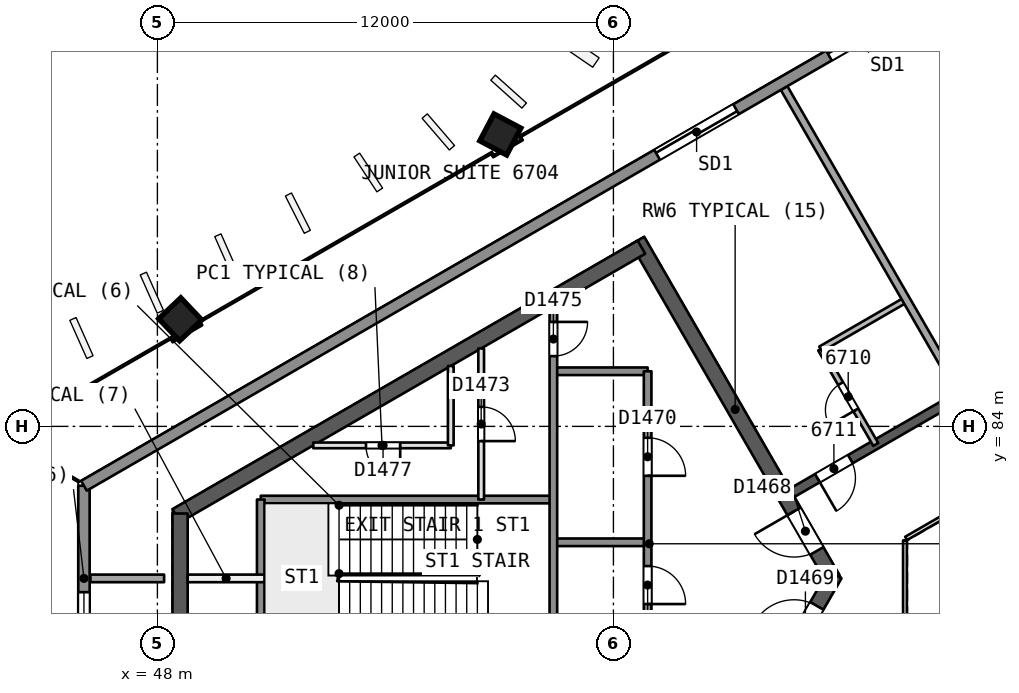
"""IFC4 building model, lengths in metres.
Left out: names, types, materials, properties, quantities, classifications, styles, units other than length and angle.
Written with IfcOpenShell. Run it as: python <this file> out.ifc"""

import sys

from ifc_helpers import new_model, si_unit, direction, frame, frame_2d, origin, origin_2d, place, context, subcontext, project, spatial, rectangle, extrude, element, fill, save


model = new_model("IFC4")
c1 = context("Model", 3, precision=1e-05, world=origin(), true_north=direction((0.0, 1.0)))
c2 = subcontext(c1, "Body", "Model", "MODEL_VIEW")
j1 = project(units=[si_unit("LENGTHUNIT", "METRE"), si_unit("PLANEANGLEUNIT", "RADIAN")], contexts=[c1])
p1 = place(None, origin())
s1 = spatial("IfcSite", under=j1, at=p1, CompositionType="ELEMENT")
p2 = place(p1, origin())
s2 = spatial("IfcBuilding", under=s1, at=p2, CompositionType="ELEMENT")
p3 = place(p2, frame((0.0, 0.0, 273.8)))
s3 = spatial("IfcBuildingStorey", under=s2, at=p3, CompositionType="ELEMENT", Elevation=273.8)
p4 = place(p3, frame((65.769, 80.0, 0.0), z_axis=(0.0, 0.0, 1.0), x_axis=(-0.50000177223, 0.866024380585, 0.0)))
e1 = element("IfcWall", 1, at=p4, inside=s3, PredefinedType="SHEAR", context=c2, shape_type="SweptSolid", body=[
    extrude(rectangle(XDim=10.265, YDim=0.4, at=frame_2d((5.132, 0.0))), origin(), (0.0, 0.0, 1.0), 3.7),
])
p5 = place(p4, frame((0.834, 0.0, 0.0)))
e2 = element("IfcOpeningElement", 2, at=p5, cuts=e1, PredefinedType="OPENING", context=c2, shape_type="SweptSolid", body=[
    extrude(rectangle(XDim=1.2, YDim=2.1, at=frame_2d((0.6, 1.05))), frame((0.0, 0.21, 0.0), z_axis=(0.0, -1.0, 0.0), x_axis=(1.0, 0.0, 0.0)), (0.0, 0.0, 1.0), 0.421),
])
p6 = place(p3, frame((60.737, 88.716, 0.0), z_axis=(0.0, 0.0, 1.0), x_axis=(-0.866028812667, -0.499994095595, 0.0)))
e3 = element("IfcWall", 3, at=p6, inside=s3, PredefinedType="SHEAR", context=c2, shape_type="SweptSolid", body=[
    extrude(rectangle(XDim=14.134, YDim=0.4, at=frame_2d((7.067, 0.0))), origin(), (0.0, 0.0, 1.0), 3.7),
])
p7 = place(p3, frame((48.597, 81.707, 0.0), z_axis=(0.0, 0.0, 1.0), x_axis=(0.0, -1.0, 0.0)))
e4 = element("IfcWall", 4, at=p7, inside=s3, PredefinedType="SHEAR", context=c2, shape_type="SweptSolid", body=[
    extrude(rectangle(XDim=3.53, YDim=0.4, at=frame_2d((1.765, 0.0))), origin(), (0.0, 0.0, 1.0), 3.7),
])
p8 = place(p3, frame((60.737, 71.284, 0.0), z_axis=(0.0, 0.0, 1.0), x_axis=(0.50000547566, 0.866022242388, 0.0)))
e5 = element("IfcWall", 5, at=p8, inside=s3, PredefinedType="SHEAR", context=c2, shape_type="SweptSolid", body=[
    extrude(rectangle(XDim=10.18, YDim=0.4, at=frame_2d((5.09, 0.0))), origin(), (0.0, 0.0, 1.0), 3.7),
])
p9 = place(p8, frame((8.03, 0.0, 0.0)))
e6 = element("IfcOpeningElement", 6, at=p9, cuts=e5, PredefinedType="OPENING", context=c2, shape_type="SweptSolid", body=[
    extrude(rectangle(XDim=1.2, YDim=2.1, at=frame_2d((0.6, 1.05))), frame((0.0, 0.21, 0.0), z_axis=(0.0, -1.0, 0.0), x_axis=(1.0, 0.0, 0.0)), (0.0, 0.0, 1.0), 0.421),
])
p10 = place(p3, frame((78.2, 90.046, 0.0), z_axis=(0.0, 0.0, 1.0), x_axis=(-0.866026492143, -0.499998114903, 0.0)))
e7 = element("IfcWall", 7, at=p10, inside=s3, PredefinedType="SHEAR", context=c2, shape_type="SweptSolid", body=[
    extrude(rectangle(XDim=15.588, YDim=0.25, at=frame_2d((7.794, 0.0))), origin(), (0.0, 0.0, 1.0), 3.3),
])
p11 = place(p10, frame((3.372, 0.0, 0.0)))
e8 = element("IfcOpeningElement", 8, at=p11, cuts=e7, PredefinedType="OPENING", context=c2, shape_type="SweptSolid", body=[
    extrude(rectangle(XDim=1.0, YDim=2.1, at=frame_2d((0.5, 1.05))), frame((0.0, 0.135, 0.0), z_axis=(0.0, -1.0, 0.0), x_axis=(1.0, 0.0, 0.0)), (0.0, 0.0, 1.0), 0.271),
])
p12 = place(p10, frame((8.594, 0.0, 0.0)))
e9 = element("IfcOpeningElement", 9, at=p12, cuts=e7, PredefinedType="OPENING", context=c2, shape_type="SweptSolid", body=[
    extrude(rectangle(XDim=1.0, YDim=2.1, at=frame_2d((0.5, 1.05))), frame((0.0, 0.135, 0.0), z_axis=(0.0, -1.0, 0.0), x_axis=(1.0, 0.0, 0.0)), (0.0, 0.0, 1.0), 0.271),
])
p13 = place(p10, frame((13.816, 0.0, 0.0)))
e10 = element("IfcOpeningElement", 10, at=p13, cuts=e7, PredefinedType="OPENING", context=c2, shape_type="SweptSolid", body=[
    extrude(rectangle(XDim=1.0, YDim=2.1, at=frame_2d((0.5, 1.05))), frame((0.0, 0.135, 0.0), z_axis=(0.0, -1.0, 0.0), x_axis=(1.0, 0.0, 0.0)), (0.0, 0.0, 1.0), 0.271),
])
p14 = place(p3, frame((57.001, 91.695, 0.0), z_axis=(0.019328516974, -0.012138044789, 0.999739504221), x_axis=(-0.500208848309, 0.865669585777, 0.020181088508)))
e11 = element("IfcColumn", 11, at=p14, inside=s3, PredefinedType="COLUMN", context=c2, shape_type="SweptSolid", body=[
    extrude(rectangle(XDim=0.8, YDim=0.8, at=origin_2d()), origin(), (0.0, 0.0, 1.0), 3.701),
])
p15 = place(p3, frame((48.566, 86.825, 0.0), z_axis=(0.02855911485, -0.006793507689, 0.999569019734), x_axis=(-0.500407643461, 0.865554709988, 0.020180049142)))
e12 = element("IfcColumn", 12, at=p15, inside=s3, PredefinedType="COLUMN", context=c2, shape_type="SweptSolid", body=[
    extrude(rectangle(XDim=0.8, YDim=0.8, at=origin_2d()), origin(), (0.0, 0.0, 1.0), 3.702),
])
p16 = place(p3, frame((64.49, 92.903, 0.0), z_axis=(0.0, 0.0, 1.0), x_axis=(0.500006376834, -0.866021722086, 0.0)))
e13 = element("IfcWall", 13, at=p16, inside=s3, PredefinedType="PARTITIONING", context=c2, shape_type="SweptSolid", body=[
    extrude(rectangle(XDim=9.329, YDim=0.2, at=frame_2d((4.665, 0.0))), origin(), (0.0, 0.0, 1.0), 3.3),
])
p17 = place(p3, frame((66.903, 83.524, 0.0), z_axis=(0.0, 0.0, 1.0), x_axis=(-0.499987231761, 0.866032775405, 0.0)))
e14 = element("IfcWall", 14, at=p17, inside=s3, PredefinedType="PARTITIONING", context=c2, shape_type="SweptSolid", body=[
    extrude(rectangle(XDim=2.9, YDim=0.15, at=frame_2d((1.45, 0.0))), origin(), (0.0, 0.0, 1.0), 3.3),
])
p18 = place(p17, frame((1.05, 0.0, 0.0)))
e15 = element("IfcOpeningElement", 15, at=p18, cuts=e14, PredefinedType="OPENING", context=c2, shape_type="SweptSolid", body=[
    extrude(rectangle(XDim=0.8, YDim=2.1, at=frame_2d((0.4, 1.05))), frame((0.0, 0.085, 0.0), z_axis=(0.0, -1.0, 0.0), x_axis=(1.0, 0.0, 0.0)), (0.0, 0.0, 1.0), 0.171),
])
p19 = place(p3, frame((65.453, 86.035, 0.0), z_axis=(0.0, 0.0, 1.0), x_axis=(0.866021400173, 0.500006934395, 0.0)))
e16 = element("IfcWall", 16, at=p19, inside=s3, PredefinedType="PARTITIONING", context=c2, shape_type="SweptSolid", body=[
    extrude(rectangle(XDim=2.6, YDim=0.15, at=frame_2d((1.3, 0.0))), origin(), (0.0, 0.0, 1.0), 3.3),
])
p20 = place(p3, frame((46.237, 80.0, 0.0), z_axis=(0.0, 0.0, 1.0), x_axis=(1.0, 0.0, 0.0)))
e17 = element("IfcWall", 17, at=p20, inside=s3, PredefinedType="PARTITIONING", context=c2, shape_type="SweptSolid", body=[
    extrude(rectangle(XDim=1.94, YDim=0.2, at=frame_2d((0.97, 0.0))), origin(), (0.0, 0.0, 1.0), 3.3),
])
p21 = place(p3, frame((46.067, 77.562, 0.0), z_axis=(0.0, 0.0, 1.0), x_axis=(0.0, 1.0, 0.0)))
e18 = element("IfcWall", 18, at=p21, inside=s3, PredefinedType="SOLIDWALL", context=c2, shape_type="SweptSolid", body=[
    extrude(rectangle(XDim=4.876, YDim=0.3, at=frame_2d((2.438, 0.0))), origin(), (0.0, 0.0, 1.0), 3.3),
])
p22 = place(p21, frame((0.276, 0.0, 0.9)))
e19 = element("IfcOpeningElement", 19, at=p22, cuts=e18, PredefinedType="OPENING", context=c2, shape_type="SweptSolid", body=[
    extrude(rectangle(XDim=1.8, YDim=1.5, at=frame_2d((0.9, 0.75))), frame((0.0, 0.161, 0.0), z_axis=(0.0, -1.0, 0.0), x_axis=(1.0, 0.0, 0.0)), (0.0, 0.0, 1.0), 0.321),
])
p23 = place(p3, frame((46.067, 82.438, 0.0), z_axis=(0.0, 0.0, 1.0), x_axis=(0.866024153303, 0.50000216589, 0.0)))
e20 = element("IfcWall", 20, at=p23, inside=s3, PredefinedType="SOLIDWALL", context=c2, shape_type="SweptSolid", body=[
    extrude(rectangle(XDim=47.675, YDim=0.3, at=frame_2d((23.837, 0.0))), origin(), (0.0, 0.0, 1.0), 3.3),
])
p24 = place(p23, frame((17.415, 0.0, 0.0)))
e21 = element("IfcOpeningElement", 21, at=p24, cuts=e20, PredefinedType="OPENING", context=c2, shape_type="SweptSolid", body=[
    extrude(rectangle(XDim=2.4, YDim=2.4, at=frame_2d((1.2, 1.2))), frame((0.0, 0.161, 0.0), z_axis=(0.0, -1.0, 0.0), x_axis=(1.0, 0.0, 0.0)), (0.0, 0.0, 1.0), 0.321),
])
p25 = place(p23, frame((22.637, 0.0, 0.0)))
e22 = element("IfcOpeningElement", 22, at=p25, cuts=e20, PredefinedType="OPENING", context=c2, shape_type="SweptSolid", body=[
    extrude(rectangle(XDim=2.4, YDim=2.4, at=frame_2d((1.2, 1.2))), frame((0.0, 0.161, 0.0), z_axis=(0.0, -1.0, 0.0), x_axis=(1.0, 0.0, 0.0)), (0.0, 0.0, 1.0), 0.321),
])
p26 = place(p23, frame((27.859, 0.0, 0.0)))
e23 = element("IfcOpeningElement", 23, at=p26, cuts=e20, PredefinedType="OPENING", context=c2, shape_type="SweptSolid", body=[
    extrude(rectangle(XDim=2.4, YDim=2.4, at=frame_2d((1.2, 1.2))), frame((0.0, 0.161, 0.0), z_axis=(0.0, -1.0, 0.0), x_axis=(1.0, 0.0, 0.0)), (0.0, 0.0, 1.0), 0.321),
])
p27 = place(p3, frame((60.9, 85.45, 0.0), z_axis=(0.0, 0.0, 1.0), x_axis=(-1.0, 0.0, 0.0)))
e24 = element("IfcWall", 24, at=p27, inside=s3, PredefinedType="SOLIDWALL", context=c2, shape_type="SweptSolid", body=[
    extrude(rectangle(XDim=2.48, YDim=0.2, at=frame_2d((1.24, 0.0))), origin(), (0.0, 0.0, 1.0), 3.3),
])
p28 = place(p3, frame((55.72, 83.5, 0.0), z_axis=(0.0, 0.0, 1.0), x_axis=(-1.0, 0.0, 0.0)))
e25 = element("IfcWall", 25, at=p28, inside=s3, PredefinedType="PARTITIONING", context=c2, shape_type="SweptSolid", body=[
    extrude(rectangle(XDim=3.618, YDim=0.15, at=frame_2d((1.809, 0.0))), origin(), (0.0, 0.0, 1.0), 3.3),
])
p29 = place(p28, frame((1.332, 0.0, 0.0)))
e26 = element("IfcOpeningElement", 26, at=p29, cuts=e25, PredefinedType="OPENING", context=c2, shape_type="SweptSolid", body=[
    extrude(rectangle(XDim=0.9, YDim=2.1, at=frame_2d((0.45, 1.05))), frame((0.0, 0.085, 0.0), z_axis=(0.0, -1.0, 0.0), x_axis=(1.0, 0.0, 0.0)), (0.0, 0.0, 1.0), 0.171),
])
p30 = place(p3, frame((58.42, 82.075, 0.0), z_axis=(0.0, 0.0, 1.0), x_axis=(-1.0, 0.0, 0.0)))
e27 = element("IfcWall", 27, at=p30, inside=s3, PredefinedType="SOLIDWALL", context=c2, shape_type="SweptSolid", body=[
    extrude(rectangle(XDim=7.7, YDim=0.2, at=frame_2d((3.85, 0.0))), origin(), (0.0, 0.0, 1.0), 3.3),
])
p31 = place(p3, frame((60.9, 80.95, 0.0), z_axis=(0.0, 0.0, 1.0), x_axis=(-1.0, 0.0, 0.0)))
e28 = element("IfcWall", 28, at=p31, inside=s3, PredefinedType="SOLIDWALL", context=c2, shape_type="SweptSolid", body=[
    extrude(rectangle(XDim=2.48, YDim=0.2, at=frame_2d((1.24, 0.0))), origin(), (0.0, 0.0, 1.0), 3.3),
])
p32 = place(p3, frame((50.82, 80.0, 0.0), z_axis=(0.0, 0.0, 1.0), x_axis=(-1.0, 0.0, 0.0)))
e29 = element("IfcWall", 29, at=p32, inside=s3, PredefinedType="PARTITIONING", context=c2, shape_type="SweptSolid", body=[
    extrude(rectangle(XDim=2.023, YDim=0.2, at=frame_2d((1.012, 0.0))), origin(), (0.0, 0.0, 1.0), 3.3),
])
p33 = place(p3, frame((60.9, 85.45, 0.0), z_axis=(0.0, 0.0, 1.0), x_axis=(0.0, -1.0, 0.0)))
e30 = element("IfcWall", 30, at=p33, inside=s3, PredefinedType="SOLIDWALL", context=c2, shape_type="SweptSolid", body=[
    extrude(rectangle(XDim=10.9, YDim=0.2, at=frame_2d((5.45, 0.0))), origin(), (0.0, 0.0, 1.0), 3.3),
])
p34 = place(p33, frame((1.75, 0.0, 0.0)))
e31 = element("IfcOpeningElement", 31, at=p34, cuts=e30, PredefinedType="OPENING", context=c2, shape_type="SweptSolid", body=[
    extrude(rectangle(XDim=1.0, YDim=2.1, at=frame_2d((0.5, 1.05))), frame((0.0, 0.11, 0.0), z_axis=(0.0, -1.0, 0.0), x_axis=(1.0, 0.0, 0.0)), (0.0, 0.0, 1.0), 0.221),
])
p35 = place(p33, frame((5.125, 0.0, 0.0)))
e32 = element("IfcOpeningElement", 32, at=p35, cuts=e30, PredefinedType="OPENING", context=c2, shape_type="SweptSolid", body=[
    extrude(rectangle(XDim=1.0, YDim=2.1, at=frame_2d((0.5, 1.05))), frame((0.0, 0.11, 0.0), z_axis=(0.0, -1.0, 0.0), x_axis=(1.0, 0.0, 0.0)), (0.0, 0.0, 1.0), 0.221),
])
p36 = place(p33, frame((7.375, 0.0, 0.0)))
e33 = element("IfcOpeningElement", 33, at=p36, cuts=e30, PredefinedType="OPENING", context=c2, shape_type="SweptSolid", body=[
    extrude(rectangle(XDim=1.0, YDim=2.1, at=frame_2d((0.5, 1.05))), frame((0.0, 0.11, 0.0), z_axis=(0.0, -1.0, 0.0), x_axis=(1.0, 0.0, 0.0)), (0.0, 0.0, 1.0), 0.221),
])
p37 = place(p3, frame((58.42, 87.148, 0.0), z_axis=(0.0, 0.0, 1.0), x_axis=(0.0, -1.0, 0.0)))
e34 = element("IfcWall", 34, at=p37, inside=s3, PredefinedType="SOLIDWALL", context=c2, shape_type="SweptSolid", body=[
    extrude(rectangle(XDim=10.698, YDim=0.2, at=frame_2d((5.349, 0.0))), origin(), (0.0, 0.0, 1.0), 3.3),
])
p38 = place(p37, frame((0.399, 0.0, 0.0)))
e35 = element("IfcOpeningElement", 35, at=p38, cuts=e34, PredefinedType="OPENING", context=c2, shape_type="SweptSolid", body=[
    extrude(rectangle(XDim=0.9, YDim=2.1, at=frame_2d((0.45, 1.05))), frame((0.0, 0.11, 0.0), z_axis=(0.0, -1.0, 0.0), x_axis=(1.0, 0.0, 0.0)), (0.0, 0.0, 1.0), 0.221),
])
p39 = place(p3, frame((56.52, 86.051, 0.0), z_axis=(0.0, 0.0, 1.0), x_axis=(0.0, -1.0, 0.0)))
e36 = element("IfcWall", 36, at=p39, inside=s3, PredefinedType="PARTITIONING", context=c2, shape_type="SweptSolid", body=[
    extrude(rectangle(XDim=3.976, YDim=0.15, at=frame_2d((1.988, 0.0))), origin(), (0.0, 0.0, 1.0), 3.3),
])
p40 = place(p39, frame((1.538, 0.0, 0.0)))
e37 = element("IfcOpeningElement", 37, at=p40, cuts=e36, PredefinedType="OPENING", context=c2, shape_type="SweptSolid", body=[
    extrude(rectangle(XDim=0.9, YDim=2.1, at=frame_2d((0.45, 1.05))), frame((0.0, 0.085, 0.0), z_axis=(0.0, -1.0, 0.0), x_axis=(1.0, 0.0, 0.0)), (0.0, 0.0, 1.0), 0.171),
])
p41 = place(p3, frame((55.72, 85.589, 0.0), z_axis=(0.0, 0.0, 1.0), x_axis=(0.0, -1.0, 0.0)))
e38 = element("IfcWall", 38, at=p41, inside=s3, PredefinedType="PARTITIONING", context=c2, shape_type="SweptSolid", body=[
    extrude(rectangle(XDim=2.089, YDim=0.15, at=frame_2d((1.044, 0.0))), origin(), (0.0, 0.0, 1.0), 3.3),
])
p42 = place(p3, frame((50.72, 82.075, 0.0), z_axis=(0.0, 0.0, 1.0), x_axis=(0.0, -1.0, 0.0)))
e39 = element("IfcWall", 39, at=p42, inside=s3, PredefinedType="SOLIDWALL", context=c2, shape_type="SweptSolid", body=[
    extrude(rectangle(XDim=4.15, YDim=0.2, at=frame_2d((2.075, 0.0))), origin(), (0.0, 0.0, 1.0), 3.3),
])
p43 = place(p3, frame((77.738, 86.846, 0.0), z_axis=(0.0, 0.0, 1.0), x_axis=(-0.866026658274, -0.499997827154, 0.0)))
e40 = element("IfcWall", 40, at=p43, inside=s3, PredefinedType="PARTITIONING", context=c2, shape_type="SweptSolid", body=[
    extrude(rectangle(XDim=11.588, YDim=0.1, at=frame_2d((5.794, 0.0))), origin(), (0.0, 0.0, 1.0), 3.3),
])
p44 = place(p3, frame((67.672, 81.0, 0.0), z_axis=(0.0, 0.0, 1.0), x_axis=(0.0, -1.0, 0.0)))
e41 = element("IfcWall", 41, at=p44, inside=s3, PredefinedType="PARTITIONING", context=c2, shape_type="SweptSolid", body=[
    extrude(rectangle(XDim=2.0, YDim=0.1, at=frame_2d((1.0, 0.0))), origin(), (0.0, 0.0, 1.0), 3.3),
])
p45 = place(p18, origin())
e42 = element("IfcDoor", 42, at=p45, inside=s3, OperationType="SINGLE_SWING_LEFT", PredefinedType="NOTDEFINED", context=c2, shape_type="SweptSolid", body=[
    extrude(rectangle(XDim=0.8, YDim=2.1, at=frame_2d((0.4, 1.05))), frame((0.0, 0.025, 0.0), z_axis=(0.0, -1.0, 0.0), x_axis=(1.0, 0.0, 0.0)), (0.0, 0.0, 1.0), 0.05),
])
fill(e15, e42)
p46 = place(p13, origin())
e43 = element("IfcDoor", 43, at=p46, inside=s3, OperationType="SINGLE_SWING_RIGHT", PredefinedType="NOTDEFINED", context=c2, shape_type="SweptSolid", body=[
    extrude(rectangle(XDim=1.0, YDim=2.1, at=frame_2d((0.5, 1.05))), frame((0.0, 0.025, 0.0), z_axis=(0.0, -1.0, 0.0), x_axis=(1.0, 0.0, 0.0)), (0.0, 0.0, 1.0), 0.05),
])
fill(e10, e43)
p47 = place(p22, origin())
e44 = element("IfcWindow", 44, at=p47, inside=s3, PartitioningType="SINGLE_PANEL", PredefinedType="WINDOW", context=c2, shape_type="SweptSolid", body=[
    extrude(rectangle(XDim=1.8, YDim=1.5, at=frame_2d((0.9, 0.75))), frame((0.0, 0.03, 0.0), z_axis=(0.0, -1.0, 0.0), x_axis=(1.0, 0.0, 0.0)), (0.0, 0.0, 1.0), 0.06),
])
fill(e19, e44)
p48 = place(p24, origin())
e45 = element("IfcDoor", 45, at=p48, inside=s3, OperationType="SLIDING_TO_LEFT", PredefinedType="NOTDEFINED", context=c2, shape_type="SweptSolid", body=[
    extrude(rectangle(XDim=2.4, YDim=2.4, at=frame_2d((1.2, 1.2))), frame((0.0, 0.025, 0.0), z_axis=(0.0, -1.0, 0.0), x_axis=(1.0, 0.0, 0.0)), (0.0, 0.0, 1.0), 0.05),
])
fill(e21, e45)
p49 = place(p25, origin())
e46 = element("IfcDoor", 46, at=p49, inside=s3, OperationType="SLIDING_TO_RIGHT", PredefinedType="NOTDEFINED", context=c2, shape_type="SweptSolid", body=[
    extrude(rectangle(XDim=2.4, YDim=2.4, at=frame_2d((1.2, 1.2))), frame((0.0, 0.025, 0.0), z_axis=(0.0, -1.0, 0.0), x_axis=(1.0, 0.0, 0.0)), (0.0, 0.0, 1.0), 0.05),
])
fill(e22, e46)
p50 = place(p5, origin())
e47 = element("IfcDoor", 47, at=p50, inside=s3, OperationType="SINGLE_SWING_RIGHT", PredefinedType="NOTDEFINED", context=c2, shape_type="SweptSolid", body=[
    extrude(rectangle(XDim=1.2, YDim=2.1, at=frame_2d((0.6, 1.05))), frame((0.0, 0.025, 0.0), z_axis=(0.0, -1.0, 0.0), x_axis=(1.0, 0.0, 0.0)), (0.0, 0.0, 1.0), 0.05),
])
fill(e2, e47)
p51 = place(p9, origin())
e48 = element("IfcDoor", 48, at=p51, inside=s3, OperationType="SINGLE_SWING_LEFT", PredefinedType="NOTDEFINED", context=c2, shape_type="SweptSolid", body=[
    extrude(rectangle(XDim=1.2, YDim=2.1, at=frame_2d((0.6, 1.05))), frame((0.0, 0.025, 0.0), z_axis=(0.0, -1.0, 0.0), x_axis=(1.0, 0.0, 0.0)), (0.0, 0.0, 1.0), 0.05),
])
fill(e6, e48)
p52 = place(p34, origin())
e49 = element("IfcDoor", 49, at=p52, inside=s3, OperationType="SINGLE_SWING_RIGHT", PredefinedType="NOTDEFINED", context=c2, shape_type="SweptSolid", body=[
    extrude(rectangle(XDim=1.0, YDim=2.1, at=frame_2d((0.5, 1.05))), frame((0.0, 0.025, 0.0), z_axis=(0.0, -1.0, 0.0), x_axis=(1.0, 0.0, 0.0)), (0.0, 0.0, 1.0), 0.05),
])
fill(e31, e49)
p53 = place(p35, origin())
e50 = element("IfcDoor", 50, at=p53, inside=s3, OperationType="SINGLE_SWING_RIGHT", PredefinedType="NOTDEFINED", context=c2, shape_type="SweptSolid", body=[
    extrude(rectangle(XDim=1.0, YDim=2.1, at=frame_2d((0.5, 1.05))), frame((0.0, 0.025, 0.0), z_axis=(0.0, -1.0, 0.0), x_axis=(1.0, 0.0, 0.0)), (0.0, 0.0, 1.0), 0.05),
])
fill(e32, e50)
p54 = place(p40, origin())
e51 = element("IfcDoor", 51, at=p54, inside=s3, OperationType="SINGLE_SWING_RIGHT", PredefinedType="NOTDEFINED", context=c2, shape_type="SweptSolid", body=[
    extrude(rectangle(XDim=0.9, YDim=2.1, at=frame_2d((0.45, 1.05))), frame((0.0, 0.025, 0.0), z_axis=(0.0, -1.0, 0.0), x_axis=(1.0, 0.0, 0.0)), (0.0, 0.0, 1.0), 0.05),
])
fill(e37, e51)
p55 = place(p38, origin())
e52 = element("IfcDoor", 52, at=p55, inside=s3, OperationType="SINGLE_SWING_LEFT", PredefinedType="NOTDEFINED", context=c2, shape_type="SweptSolid", body=[
    extrude(rectangle(XDim=0.9, YDim=2.1, at=frame_2d((0.45, 1.05))), frame((0.0, 0.025, 0.0), z_axis=(0.0, -1.0, 0.0), x_axis=(1.0, 0.0, 0.0)), (0.0, 0.0, 1.0), 0.05),
])
fill(e35, e52)
p56 = place(p29, origin())
e53 = element("IfcDoor", 53, at=p56, inside=s3, OperationType="SINGLE_SWING_LEFT", PredefinedType="NOTDEFINED", context=c2, shape_type="SweptSolid", body=[
    extrude(rectangle(XDim=0.9, YDim=2.1, at=frame_2d((0.45, 1.05))), frame((0.0, 0.025, 0.0), z_axis=(0.0, -1.0, 0.0), x_axis=(1.0, 0.0, 0.0)), (0.0, 0.0, 1.0), 0.05),
])
fill(e26, e53)
save(model, sys.argv[1])
